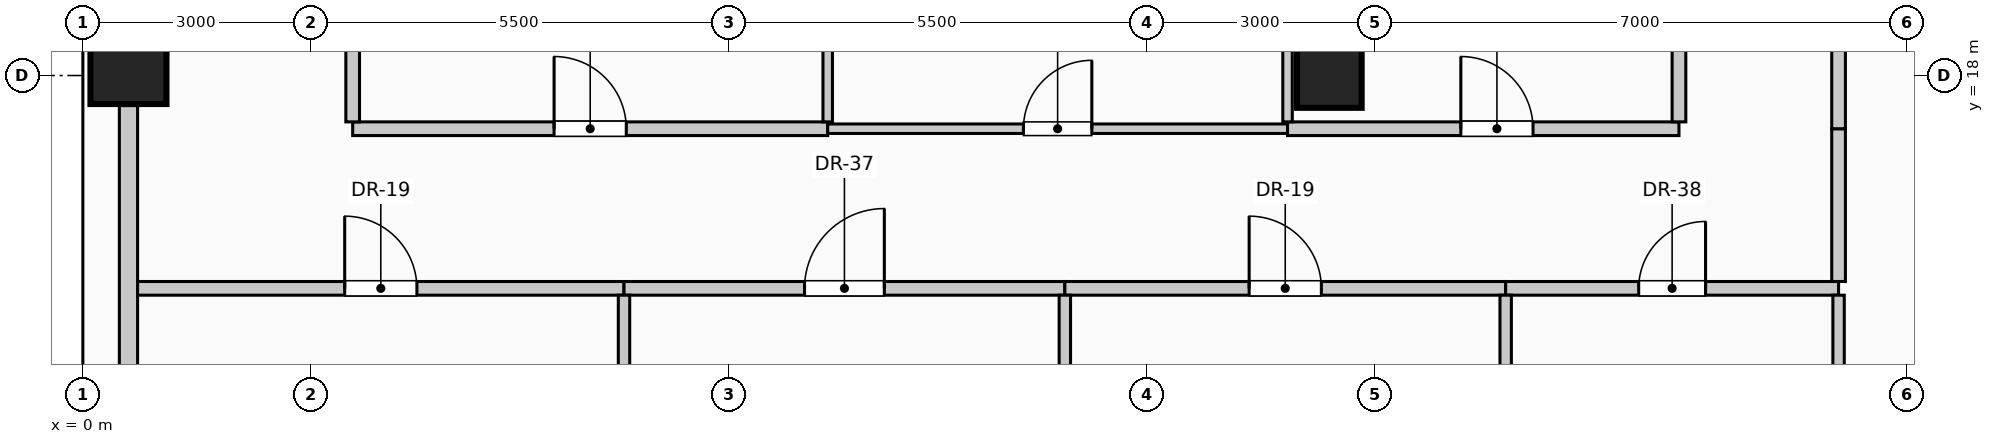
"""IFC4 building model, lengths in metres.
Left out: names, types, materials, properties, quantities, classifications, styles, units other than length and angle.
Written with IfcOpenShell. Run it as: python <this file> out.ifc"""

import sys

from ifc_helpers import new_model, si_unit, direction, frame, frame_2d, origin, origin_2d, place, context, subcontext, project, spatial, rectangle, circle, extrude, element, fill, save


model = new_model("IFC4")
c1 = context("Model", 3, precision=1e-05, world=origin(), true_north=direction((0.0, 1.0)))
c2 = subcontext(c1, "Body", "Model", "MODEL_VIEW")
j1 = project(units=[si_unit("LENGTHUNIT", "METRE"), si_unit("PLANEANGLEUNIT", "RADIAN")], contexts=[c1])
p1 = place(None, origin())
s1 = spatial("IfcSite", under=j1, at=p1, CompositionType="ELEMENT")
p2 = place(p1, origin())
s2 = spatial("IfcBuilding", under=s1, at=p2, CompositionType="ELEMENT")
p3 = place(p2, frame((0.0, 0.0, 256.6)))
s3 = spatial("IfcBuildingStorey", under=s2, at=p3, CompositionType="ELEMENT", Elevation=256.6)
p4 = place(p3, frame((0.6, 18.0, 0.0), z_axis=(0.0, 0.0, 1.0), x_axis=(0.0, 1.0, 0.0)))
e1 = element("IfcColumn", 1, at=p4, inside=s3, PredefinedType="COLUMN", context=c2, shape_type="SweptSolid", body=[
    extrude(rectangle(XDim=0.75, YDim=1.0, at=origin_2d()), origin(), (0.0, 0.0, 1.0), 4.0),
])
p5 = place(p3, frame((16.4, 18.0, 0.0), z_axis=(0.0, 0.0, 1.0), x_axis=(1.0, 0.0, 0.0)))
e2 = element("IfcColumn", 2, at=p5, inside=s3, PredefinedType="COLUMN", context=c2, shape_type="SweptSolid", body=[
    extrude(circle(Radius=0.425, at=origin_2d()), origin(), (0.0, 0.0, 1.0), 4.0),
])
p6 = place(p3, frame((0.6, 10.395, 0.0), z_axis=(0.0, 0.0, 1.0), x_axis=(0.0, 1.0, 0.0)))
e3 = element("IfcWall", 3, at=p6, inside=s3, PredefinedType="SOLIDWALL", context=c2, shape_type="SweptSolid", body=[
    extrude(rectangle(XDim=7.21, YDim=0.24, at=frame_2d((3.605, 0.0))), origin(), (0.0, 0.0, 1.0), 3.0),
])
p7 = place(p6, frame((1.203, 0.0, 0.42)))
e4 = element("IfcOpeningElement", 4, at=p7, cuts=e3, PredefinedType="OPENING", context=c2, shape_type="SweptSolid", body=[
    extrude(rectangle(XDim=1.8, YDim=2.2, at=frame_2d((0.9, 1.1))), frame((0.0, 0.13, 0.0), z_axis=(0.0, -1.0, 0.0), x_axis=(1.0, 0.0, 0.0)), (0.0, 0.0, 1.0), 0.26),
])
p8 = place(p3, frame((0.72, 15.2, 0.0), z_axis=(0.0, 0.0, 1.0), x_axis=(1.0, 0.0, 0.0)))
e5 = element("IfcWall", 5, at=p8, inside=s3, PredefinedType="PARTITIONING", context=c2, shape_type="SweptSolid", body=[
    extrude(rectangle(XDim=6.4, YDim=0.18, at=frame_2d((3.2, 0.0))), origin(), (0.0, 0.0, 1.0), 3.75),
])
p9 = place(p8, frame((2.725, 0.0, 0.0)))
e6 = element("IfcOpeningElement", 6, at=p9, cuts=e5, PredefinedType="OPENING", context=c2, shape_type="SweptSolid", body=[
    extrude(rectangle(XDim=0.95, YDim=2.15, at=frame_2d((0.475, 1.075))), frame((0.0, 0.1, 0.0), z_axis=(0.0, -1.0, 0.0), x_axis=(1.0, 0.0, 0.0)), (0.0, 0.0, 1.0), 0.2),
])
p10 = place(p3, frame((7.12, 15.2, 0.0), z_axis=(0.0, 0.0, 1.0), x_axis=(1.0, 0.0, 0.0)))
e7 = element("IfcWall", 7, at=p10, inside=s3, PredefinedType="PARTITIONING", context=c2, shape_type="SweptSolid", body=[
    extrude(rectangle(XDim=5.8, YDim=0.18, at=frame_2d((2.9, 0.0))), origin(), (0.0, 0.0, 1.0), 3.75),
])
p11 = place(p10, frame((2.375, 0.0, 0.0)))
e8 = element("IfcOpeningElement", 8, at=p11, cuts=e7, PredefinedType="OPENING", context=c2, shape_type="SweptSolid", body=[
    extrude(rectangle(XDim=1.05, YDim=2.15, at=frame_2d((0.525, 1.075))), frame((0.0, 0.1, 0.0), z_axis=(0.0, -1.0, 0.0), x_axis=(1.0, 0.0, 0.0)), (0.0, 0.0, 1.0), 0.2),
])
p12 = place(p3, frame((12.92, 15.2, 0.0), z_axis=(0.0, 0.0, 1.0), x_axis=(1.0, 0.0, 0.0)))
e9 = element("IfcWall", 9, at=p12, inside=s3, PredefinedType="PARTITIONING", context=c2, shape_type="SweptSolid", body=[
    extrude(rectangle(XDim=5.8, YDim=0.18, at=frame_2d((2.9, 0.0))), origin(), (0.0, 0.0, 1.0), 3.75),
])
p13 = place(p12, frame((2.425, 0.0, 0.0)))
e10 = element("IfcOpeningElement", 10, at=p13, cuts=e9, PredefinedType="OPENING", context=c2, shape_type="SweptSolid", body=[
    extrude(rectangle(XDim=0.95, YDim=2.15, at=frame_2d((0.475, 1.075))), frame((0.0, 0.1, 0.0), z_axis=(0.0, -1.0, 0.0), x_axis=(1.0, 0.0, 0.0)), (0.0, 0.0, 1.0), 0.2),
])
p14 = place(p3, frame((18.72, 15.2, 0.0), z_axis=(0.0, 0.0, 1.0), x_axis=(1.0, 0.0, 0.0)))
e11 = element("IfcWall", 11, at=p14, inside=s3, PredefinedType="PARTITIONING", context=c2, shape_type="SweptSolid", body=[
    extrude(rectangle(XDim=4.38, YDim=0.18, at=frame_2d((2.19, 0.0))), origin(), (0.0, 0.0, 1.0), 3.75),
])
p15 = place(p14, frame((1.75, 0.0, 0.0)))
e12 = element("IfcOpeningElement", 12, at=p15, cuts=e11, PredefinedType="OPENING", context=c2, shape_type="SweptSolid", body=[
    extrude(rectangle(XDim=0.88, YDim=2.1, at=frame_2d((0.44, 1.05))), frame((0.0, 0.1, 0.0), z_axis=(0.0, -1.0, 0.0), x_axis=(1.0, 0.0, 0.0)), (0.0, 0.0, 1.0), 0.2),
])
p16 = place(p3, frame((3.55, 17.3, 0.0), z_axis=(0.0, 0.0, 1.0), x_axis=(1.0, 0.0, 0.0)))
e13 = element("IfcWall", 13, at=p16, inside=s3, PredefinedType="PARTITIONING", context=c2, shape_type="SweptSolid", body=[
    extrude(rectangle(XDim=6.25, YDim=0.18, at=frame_2d((3.125, 0.0))), origin(), (0.0, 0.0, 1.0), 3.75),
])
p17 = place(p16, frame((2.65, 0.0, 0.0)))
e14 = element("IfcOpeningElement", 14, at=p17, cuts=e13, PredefinedType="OPENING", context=c2, shape_type="SweptSolid", body=[
    extrude(rectangle(XDim=0.95, YDim=2.15, at=frame_2d((0.475, 1.075))), frame((0.0, 0.1, 0.0), z_axis=(0.0, -1.0, 0.0), x_axis=(1.0, 0.0, 0.0)), (0.0, 0.0, 1.0), 0.2),
])
p18 = place(p3, frame((9.8, 17.3, 0.0), z_axis=(0.0, 0.0, 1.0), x_axis=(1.0, 0.0, 0.0)))
e15 = element("IfcWall", 15, at=p18, inside=s3, PredefinedType="PARTITIONING", context=c2, shape_type="SweptSolid", body=[
    extrude(rectangle(XDim=6.05, YDim=0.125, at=frame_2d((3.025, 0.0))), origin(), (0.0, 0.0, 1.0), 3.75),
])
p19 = place(p18, frame((2.575, 0.0, 0.0)))
e16 = element("IfcOpeningElement", 16, at=p19, cuts=e15, PredefinedType="OPENING", context=c2, shape_type="SweptSolid", body=[
    extrude(rectangle(XDim=0.9, YDim=2.1, at=frame_2d((0.45, 1.05))), frame((0.0, 0.073, 0.0), z_axis=(0.0, -1.0, 0.0), x_axis=(1.0, 0.0, 0.0)), (0.0, 0.0, 1.0), 0.145),
])
p20 = place(p3, frame((15.85, 17.3, 0.0), z_axis=(0.0, 0.0, 1.0), x_axis=(1.0, 0.0, 0.0)))
e17 = element("IfcWall", 17, at=p20, inside=s3, PredefinedType="PARTITIONING", context=c2, shape_type="SweptSolid", body=[
    extrude(rectangle(XDim=5.15, YDim=0.18, at=frame_2d((2.575, 0.0))), origin(), (0.0, 0.0, 1.0), 3.75),
])
p21 = place(p20, frame((2.28, 0.0, 0.0)))
e18 = element("IfcOpeningElement", 18, at=p21, cuts=e17, PredefinedType="OPENING", context=c2, shape_type="SweptSolid", body=[
    extrude(rectangle(XDim=0.95, YDim=2.15, at=frame_2d((0.475, 1.075))), frame((0.0, 0.1, 0.0), z_axis=(0.0, -1.0, 0.0), x_axis=(1.0, 0.0, 0.0)), (0.0, 0.0, 1.0), 0.2),
])
p22 = place(p3, frame((3.55, 17.39, 0.0), z_axis=(0.0, 0.0, 1.0), x_axis=(0.0, 1.0, 0.0)))
e19 = element("IfcWall", 19, at=p22, inside=s3, PredefinedType="PARTITIONING", context=c2, shape_type="SweptSolid", body=[
    extrude(rectangle(XDim=7.335, YDim=0.18, at=frame_2d((3.667, 0.0))), origin(), (0.0, 0.0, 1.0), 3.75),
])
p23 = place(p3, frame((7.12, 0.72, 0.0), z_axis=(0.0, 0.0, 1.0), x_axis=(0.0, 1.0, 0.0)))
e20 = element("IfcWall", 20, at=p23, inside=s3, PredefinedType="PARTITIONING", context=c2, shape_type="SweptSolid", body=[
    extrude(rectangle(XDim=14.39, YDim=0.15, at=frame_2d((7.195, 0.0))), origin(), (0.0, 0.0, 1.0), 3.75),
])
p24 = place(p3, frame((9.8, 17.39, 0.0), z_axis=(0.0, 0.0, 1.0), x_axis=(0.0, 1.0, 0.0)))
e21 = element("IfcWall", 21, at=p24, inside=s3, PredefinedType="PARTITIONING", context=c2, shape_type="SweptSolid", body=[
    extrude(rectangle(XDim=7.335, YDim=0.125, at=frame_2d((3.667, 0.0))), origin(), (0.0, 0.0, 1.0), 3.75),
])
p25 = place(p3, frame((12.92, 0.72, 0.0), z_axis=(0.0, 0.0, 1.0), x_axis=(0.0, 1.0, 0.0)))
e22 = element("IfcWall", 22, at=p25, inside=s3, PredefinedType="PARTITIONING", context=c2, shape_type="SweptSolid", body=[
    extrude(rectangle(XDim=14.39, YDim=0.15, at=frame_2d((7.195, 0.0))), origin(), (0.0, 0.0, 1.0), 3.75),
])
p26 = place(p3, frame((15.85, 17.39, 0.0), z_axis=(0.0, 0.0, 1.0), x_axis=(0.0, 1.0, 0.0)))
e23 = element("IfcWall", 23, at=p26, inside=s3, PredefinedType="PARTITIONING", context=c2, shape_type="SweptSolid", body=[
    extrude(rectangle(XDim=7.335, YDim=0.125, at=frame_2d((3.667, 0.0))), origin(), (0.0, 0.0, 1.0), 3.75),
])
p27 = place(p3, frame((18.72, 0.72, 0.0), z_axis=(0.0, 0.0, 1.0), x_axis=(0.0, 1.0, 0.0)))
e24 = element("IfcWall", 24, at=p27, inside=s3, PredefinedType="PARTITIONING", context=c2, shape_type="SweptSolid", body=[
    extrude(rectangle(XDim=14.39, YDim=0.15, at=frame_2d((7.195, 0.0))), origin(), (0.0, 0.0, 1.0), 3.75),
])
p28 = place(p3, frame((21.0, 17.39, 0.0), z_axis=(0.0, 0.0, 1.0), x_axis=(0.0, 1.0, 0.0)))
e25 = element("IfcWall", 25, at=p28, inside=s3, PredefinedType="PARTITIONING", context=c2, shape_type="SweptSolid", body=[
    extrude(rectangle(XDim=7.335, YDim=0.18, at=frame_2d((3.667, 0.0))), origin(), (0.0, 0.0, 1.0), 3.75),
])
p29 = place(p3, frame((23.1, 0.72, 0.0), z_axis=(0.0, 0.0, 1.0), x_axis=(0.0, 1.0, 0.0)))
e26 = element("IfcWall", 26, at=p29, inside=s3, PredefinedType="PARTITIONING", context=c2, shape_type="SweptSolid", body=[
    extrude(rectangle(XDim=14.39, YDim=0.15, at=frame_2d((7.195, 0.0))), origin(), (0.0, 0.0, 1.0), 3.75),
])
p30 = place(p3, frame((23.1, 15.29, 0.0), z_axis=(0.0, 0.0, 1.0), x_axis=(0.0, 1.0, 0.0)))
e27 = element("IfcWall", 27, at=p30, inside=s3, PredefinedType="PARTITIONING", context=c2, shape_type="SweptSolid", body=[
    extrude(rectangle(XDim=2.01, YDim=0.18, at=frame_2d((1.005, 0.0))), origin(), (0.0, 0.0, 1.0), 3.75),
])
p31 = place(p3, frame((23.1, 17.3, 0.0), z_axis=(0.0, 0.0, 1.0), x_axis=(0.0, 1.0, 0.0)))
e28 = element("IfcWall", 28, at=p31, inside=s3, PredefinedType="PARTITIONING", context=c2, shape_type="SweptSolid", body=[
    extrude(rectangle(XDim=9.51, YDim=0.18, at=frame_2d((4.755, 0.0))), origin(), (0.0, 0.0, 1.0), 3.75),
])
p32 = place(p9, origin())
e29 = element("IfcDoor", 29, at=p32, inside=s3, OperationType="SINGLE_SWING_LEFT", PredefinedType="DOOR", context=c2, shape_type="SweptSolid", body=[
    extrude(rectangle(XDim=0.95, YDim=2.15, at=frame_2d((0.475, 1.075))), frame((0.0, 0.025, 0.0), z_axis=(0.0, -1.0, 0.0), x_axis=(1.0, 0.0, 0.0)), (0.0, 0.0, 1.0), 0.05),
])
fill(e6, e29)
p33 = place(p11, origin())
e30 = element("IfcDoor", 30, at=p33, inside=s3, OperationType="SINGLE_SWING_RIGHT", PredefinedType="DOOR", context=c2, shape_type="SweptSolid", body=[
    extrude(rectangle(XDim=1.05, YDim=2.15, at=frame_2d((0.525, 1.075))), frame((0.0, 0.025, 0.0), z_axis=(0.0, -1.0, 0.0), x_axis=(1.0, 0.0, 0.0)), (0.0, 0.0, 1.0), 0.05),
])
fill(e8, e30)
p34 = place(p13, origin())
e31 = element("IfcDoor", 31, at=p34, inside=s3, OperationType="SINGLE_SWING_LEFT", PredefinedType="DOOR", context=c2, shape_type="SweptSolid", body=[
    extrude(rectangle(XDim=0.95, YDim=2.15, at=frame_2d((0.475, 1.075))), frame((0.0, 0.025, 0.0), z_axis=(0.0, -1.0, 0.0), x_axis=(1.0, 0.0, 0.0)), (0.0, 0.0, 1.0), 0.05),
])
fill(e10, e31)
p35 = place(p15, origin())
e32 = element("IfcDoor", 32, at=p35, inside=s3, OperationType="SINGLE_SWING_RIGHT", PredefinedType="DOOR", context=c2, shape_type="SweptSolid", body=[
    extrude(rectangle(XDim=0.88, YDim=2.1, at=frame_2d((0.44, 1.05))), frame((0.0, 0.025, 0.0), z_axis=(0.0, -1.0, 0.0), x_axis=(1.0, 0.0, 0.0)), (0.0, 0.0, 1.0), 0.05),
])
fill(e12, e32)
p36 = place(p17, origin())
e33 = element("IfcDoor", 33, at=p36, inside=s3, OperationType="SINGLE_SWING_LEFT", PredefinedType="DOOR", context=c2, shape_type="SweptSolid", body=[
    extrude(rectangle(XDim=0.95, YDim=2.15, at=frame_2d((0.475, 1.075))), frame((0.0, 0.025, 0.0), z_axis=(0.0, -1.0, 0.0), x_axis=(1.0, 0.0, 0.0)), (0.0, 0.0, 1.0), 0.05),
])
fill(e14, e33)
p37 = place(p19, origin())
e34 = element("IfcDoor", 34, at=p37, inside=s3, OperationType="SINGLE_SWING_RIGHT", PredefinedType="DOOR", context=c2, shape_type="SweptSolid", body=[
    extrude(rectangle(XDim=0.9, YDim=2.1, at=frame_2d((0.45, 1.05))), frame((0.0, 0.025, 0.0), z_axis=(0.0, -1.0, 0.0), x_axis=(1.0, 0.0, 0.0)), (0.0, 0.0, 1.0), 0.05),
])
fill(e16, e34)
p38 = place(p21, origin())
e35 = element("IfcDoor", 35, at=p38, inside=s3, OperationType="SINGLE_SWING_LEFT", PredefinedType="DOOR", context=c2, shape_type="SweptSolid", body=[
    extrude(rectangle(XDim=0.95, YDim=2.15, at=frame_2d((0.475, 1.075))), frame((0.0, 0.025, 0.0), z_axis=(0.0, -1.0, 0.0), x_axis=(1.0, 0.0, 0.0)), (0.0, 0.0, 1.0), 0.05),
])
fill(e18, e35)
save(model, sys.argv[1])
